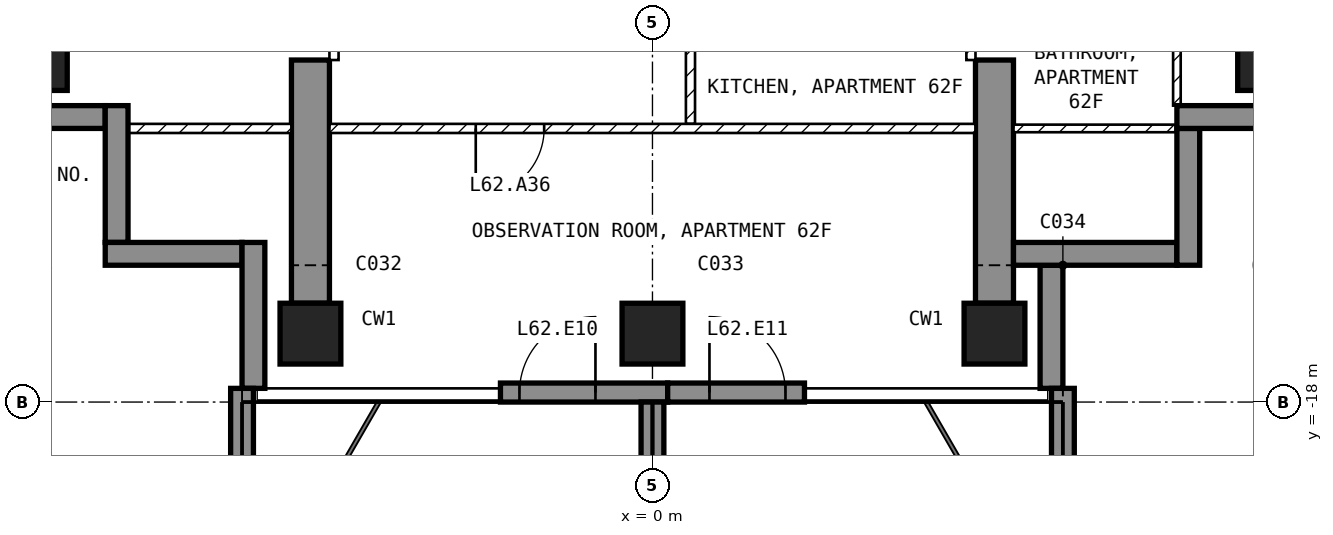
"""IFC4 building model, lengths in metres.
Left out: names, types, materials, properties, quantities, classifications, styles, units other than length and angle.
Written with IfcOpenShell. Run it as: python <this file> out.ifc"""

import sys

from ifc_helpers import new_model, si_unit, direction, frame, frame_2d, origin, origin_2d, place, context, subcontext, project, spatial, polyline, rectangle, outline, extrude, element, fill, save


model = new_model("IFC4")
c1 = context("Model", 3, precision=1e-05, world=origin(), true_north=direction((0.0, 1.0)))
c2 = subcontext(c1, "Body", "Model", "MODEL_VIEW")
j1 = project(units=[si_unit("LENGTHUNIT", "METRE"), si_unit("PLANEANGLEUNIT", "RADIAN")], contexts=[c1])
p1 = place(None, origin())
s1 = spatial("IfcSite", under=j1, at=p1, CompositionType="ELEMENT")
p2 = place(p1, origin())
s2 = spatial("IfcBuilding", under=s1, at=p2, CompositionType="ELEMENT")
p3 = place(p2, frame((0.0, 0.0, 246.5)))
s3 = spatial("IfcBuildingStorey", under=s2, at=p3, CompositionType="ELEMENT", Elevation=246.5)
for number, where, z_axis, x_axis in (
    (1, (-8.1, -13.5, -0.25), (0.0, 0.0, 1.0), (1.0, 0.0, 0.0)),
    (2, (-4.5, -17.1, -0.25), (0.0, 0.0, 1.0), (1.0, 0.0, 0.0)),
    (3, (0.0, -17.1, -0.25), (0.0, 0.0, 1.0), (1.0, 0.0, 0.0)),
    (4, (4.5, -17.1, -0.25), (0.0, 0.0, 1.0), (1.0, 0.0, 0.0)),
    (5, (8.1, -13.5, -0.25), (0.0, 0.0, 1.0), (1.0, 0.0, 0.0)),
):
    element("IfcColumn", number, at=place(p3, frame(where, z_axis=z_axis, x_axis=x_axis)), inside=s3, PredefinedType="COLUMN", context=c2, shape_type="SweptSolid", body=[
        extrude(rectangle(XDim=0.8, YDim=0.8, at=origin_2d()), origin(), (0.0, 0.0, 1.0), 3.5),
    ])
for number, where, z_axis, x_axis in (
    (6, (-4.75, -16.7, -0.25), (1.0, 0.0, 0.0), (0.0, 1.0, 0.0)),
    (7, (4.25, -16.7, -0.25), (1.0, 0.0, 0.0), (0.0, 1.0, 0.0)),
):
    element("IfcWall", number, at=place(p3, frame(where, z_axis=z_axis, x_axis=x_axis)), inside=s3, PredefinedType="SHEAR", context=c2, shape_type="SweptSolid", body=[
        extrude(outline(polyline([(0.0, 0.0), (3.2, 0.0), (3.2, 2.65), (5.6, 2.65), (5.6, 0.0), (7.7, 0.0), (7.7, 3.5), (0.0, 3.5), (0.0, 0.0)])), origin(), (0.0, 0.0, 1.0), 0.5),
    ])
p4 = place(p3, frame((-2.0, -17.875, 0.0), z_axis=(0.0, 0.0, 1.0), x_axis=(1.0, 0.0, 0.0)))
e8 = element("IfcWall", 8, at=p4, inside=s3, PredefinedType="SOLIDWALL", context=c2, shape_type="SweptSolid", body=[
    extrude(rectangle(XDim=2.2, YDim=0.25, at=frame_2d((1.1, 0.0))), origin(), (0.0, 0.0, 1.0), 3.25),
])
p5 = place(p4, frame((0.25, 0.0, 0.0)))
e9 = element("IfcOpeningElement", 9, at=p5, cuts=e8, PredefinedType="OPENING", context=c2, shape_type="SweptSolid", body=[
    extrude(rectangle(XDim=1.0, YDim=2.4, at=frame_2d((0.5, 1.2))), frame((0.0, 0.135, 0.0), z_axis=(0.0, -1.0, 0.0), x_axis=(1.0, 0.0, 0.0)), (0.0, 0.0, 1.0), 0.27),
])
p6 = place(p3, frame((0.2, -17.875, 0.0), z_axis=(0.0, 0.0, 1.0), x_axis=(1.0, 0.0, 0.0)))
e10 = element("IfcWall", 10, at=p6, inside=s3, PredefinedType="SOLIDWALL", context=c2, shape_type="SweptSolid", body=[
    extrude(rectangle(XDim=1.8, YDim=0.25, at=frame_2d((0.9, 0.0))), origin(), (0.0, 0.0, 1.0), 3.25),
])
p7 = place(p6, frame((0.55, 0.0, 0.0)))
e11 = element("IfcOpeningElement", 11, at=p7, cuts=e10, PredefinedType="OPENING", context=c2, shape_type="SweptSolid", body=[
    extrude(rectangle(XDim=1.0, YDim=2.4, at=frame_2d((0.5, 1.2))), frame((0.0, 0.135, 0.0), z_axis=(0.0, -1.0, 0.0), x_axis=(1.0, 0.0, 0.0)), (0.0, 0.0, 1.0), 0.27),
])
p8 = place(p3, frame((5.25, -17.82, 0.0), z_axis=(0.0, 0.0, 1.0), x_axis=(0.0, 1.0, 0.0)))
e12 = element("IfcWall", 12, at=p8, inside=s3, PredefinedType="SOLIDWALL", context=c2, shape_type="SweptSolid", body=[
    extrude(rectangle(XDim=1.62, YDim=0.3, at=frame_2d((0.81, 0.0))), origin(), (0.0, 0.0, 1.0), 3.25),
])
p9 = place(p3, frame((4.75, -16.05, 0.0), z_axis=(0.0, 0.0, 1.0), x_axis=(1.0, 0.0, 0.0)))
e13 = element("IfcWall", 13, at=p9, inside=s3, PredefinedType="SOLIDWALL", context=c2, shape_type="SweptSolid", body=[
    extrude(rectangle(XDim=2.15, YDim=0.3, at=frame_2d((1.075, 0.0))), origin(), (0.0, 0.0, 1.0), 3.25),
])
p10 = place(p3, frame((7.05, -16.2, 0.0), z_axis=(0.0, 0.0, 1.0), x_axis=(0.0, 1.0, 0.0)))
e14 = element("IfcWall", 14, at=p10, inside=s3, PredefinedType="SOLIDWALL", context=c2, shape_type="SweptSolid", body=[
    extrude(rectangle(XDim=1.8, YDim=0.3, at=frame_2d((0.9, 0.0))), origin(), (0.0, 0.0, 1.0), 3.25),
])
p11 = place(p3, frame((6.9, -14.25, 0.0), z_axis=(0.0, 0.0, 1.0), x_axis=(1.0, 0.0, 0.0)))
e15 = element("IfcWall", 15, at=p11, inside=s3, PredefinedType="SOLIDWALL", context=c2, shape_type="SweptSolid", body=[
    extrude(rectangle(XDim=1.85, YDim=0.3, at=frame_2d((0.925, 0.0))), origin(), (0.0, 0.0, 1.0), 3.25),
])
p12 = place(p3, frame((-8.75, -14.25, 0.0), z_axis=(0.0, 0.0, 1.0), x_axis=(1.0, 0.0, 0.0)))
e16 = element("IfcWall", 16, at=p12, inside=s3, PredefinedType="SOLIDWALL", context=c2, shape_type="SweptSolid", body=[
    extrude(rectangle(XDim=1.55, YDim=0.3, at=frame_2d((0.775, 0.0))), origin(), (0.0, 0.0, 1.0), 3.25),
])
p13 = place(p3, frame((-7.05, -14.1, 0.0), z_axis=(0.0, 0.0, 1.0), x_axis=(0.0, -1.0, 0.0)))
e17 = element("IfcWall", 17, at=p13, inside=s3, PredefinedType="SOLIDWALL", context=c2, shape_type="SweptSolid", body=[
    extrude(rectangle(XDim=1.8, YDim=0.3, at=frame_2d((0.9, 0.0))), origin(), (0.0, 0.0, 1.0), 3.25),
])
p14 = place(p3, frame((-7.2, -16.05, 0.0), z_axis=(0.0, 0.0, 1.0), x_axis=(1.0, 0.0, 0.0)))
e18 = element("IfcWall", 18, at=p14, inside=s3, PredefinedType="SOLIDWALL", context=c2, shape_type="SweptSolid", body=[
    extrude(rectangle(XDim=1.8, YDim=0.3, at=frame_2d((0.9, 0.0))), origin(), (0.0, 0.0, 1.0), 3.25),
])
p15 = place(p3, frame((-5.25, -15.9, 0.0), z_axis=(0.0, 0.0, 1.0), x_axis=(0.0, -1.0, 0.0)))
e19 = element("IfcWall", 19, at=p15, inside=s3, PredefinedType="SOLIDWALL", context=c2, shape_type="SweptSolid", body=[
    extrude(rectangle(XDim=1.92, YDim=0.3, at=frame_2d((0.96, 0.0))), origin(), (0.0, 0.0, 1.0), 3.25),
])
p16 = place(p3, frame((-5.4, -17.82, 0.0), z_axis=(0.0, 0.0, 1.0), x_axis=(0.0, -1.0, 0.0)))
e20 = element("IfcWall", 20, at=p16, inside=s3, PredefinedType="SOLIDWALL", context=c2, shape_type="SweptSolid", body=[
    extrude(rectangle(XDim=2.88, YDim=0.3, at=frame_2d((1.44, 0.0))), origin(), (0.0, 0.0, 1.0), 3.25),
])
p17 = place(p3, frame((0.0, -18.0, 0.0), z_axis=(0.0, 0.0, 1.0), x_axis=(0.0, -1.0, 0.0)))
e21 = element("IfcWall", 21, at=p17, inside=s3, PredefinedType="SOLIDWALL", context=c2, shape_type="SweptSolid", body=[
    extrude(rectangle(XDim=2.7, YDim=0.3, at=frame_2d((1.35, 0.0))), origin(), (0.0, 0.0, 1.0), 3.25),
])
p18 = place(p3, frame((5.4, -17.82, 0.0), z_axis=(0.0, 0.0, 1.0), x_axis=(0.0, -1.0, 0.0)))
e22 = element("IfcWall", 22, at=p18, inside=s3, PredefinedType="SOLIDWALL", context=c2, shape_type="SweptSolid", body=[
    extrude(rectangle(XDim=2.88, YDim=0.3, at=frame_2d((1.44, 0.0))), origin(), (0.0, 0.0, 1.0), 3.25),
])
p19 = place(p3, frame((0.5, -11.46, 0.0), z_axis=(0.0, 0.0, 1.0), x_axis=(0.0, -1.0, 0.0)))
e23 = element("IfcWall", 23, at=p19, inside=s3, PredefinedType="PARTITIONING", context=c2, shape_type="SweptSolid", body=[
    extrude(rectangle(XDim=2.88, YDim=0.12, at=frame_2d((1.44, 0.0))), origin(), (0.0, 0.0, 1.0), 3.25),
])
p20 = place(p19, frame((0.99, 0.0, 0.0)))
e24 = element("IfcOpeningElement", 24, at=p20, cuts=e23, PredefinedType="OPENING", context=c2, shape_type="SweptSolid", body=[
    extrude(rectangle(XDim=0.9, YDim=2.1, at=frame_2d((0.45, 1.05))), frame((0.0, 0.07, 0.0), z_axis=(0.0, -1.0, 0.0), x_axis=(1.0, 0.0, 0.0)), (0.0, 0.0, 1.0), 0.14),
])
p21 = place(p3, frame((4.25, -14.4, 0.0), z_axis=(0.0, 0.0, 1.0), x_axis=(-1.0, 0.0, 0.0)))
e25 = element("IfcWall", 25, at=p21, inside=s3, PredefinedType="PARTITIONING", context=c2, shape_type="SweptSolid", body=[
    extrude(rectangle(XDim=8.5, YDim=0.12, at=frame_2d((4.25, 0.0))), origin(), (0.0, 0.0, 1.0), 3.25),
])
p22 = place(p21, frame((5.675, 0.0, 0.0)))
e26 = element("IfcOpeningElement", 26, at=p22, cuts=e25, PredefinedType="OPENING", context=c2, shape_type="SweptSolid", body=[
    extrude(rectangle(XDim=0.9, YDim=2.1, at=frame_2d((0.45, 1.05))), frame((0.0, 0.07, 0.0), z_axis=(0.0, -1.0, 0.0), x_axis=(1.0, 0.0, 0.0)), (0.0, 0.0, 1.0), 0.14),
])
p23 = place(p3, frame((6.9, -14.1, 0.0), z_axis=(0.0, 0.0, 1.0), x_axis=(0.0, 1.0, 0.0)))
e27 = element("IfcWall", 27, at=p23, inside=s3, PredefinedType="PARTITIONING", context=c2, shape_type="SweptSolid", body=[
    extrude(rectangle(XDim=2.65, YDim=0.1, at=frame_2d((1.325, 0.0))), origin(), (0.0, 0.0, 1.0), 3.25),
])
p24 = place(p3, frame((7.12, -14.4, 0.0), z_axis=(0.0, 0.0, 1.0), x_axis=(-1.0, 0.0, 0.0)))
e28 = element("IfcWall", 28, at=p24, inside=s3, PredefinedType="PARTITIONING", context=c2, shape_type="SweptSolid", body=[
    extrude(rectangle(XDim=2.37, YDim=0.1, at=frame_2d((1.185, 0.0))), origin(), (0.0, 0.0, 1.0), 3.25),
])
p25 = place(p3, frame((-4.75, -14.4, 0.0), z_axis=(0.0, 0.0, 1.0), x_axis=(-1.0, 0.0, 0.0)))
e29 = element("IfcWall", 29, at=p25, inside=s3, PredefinedType="PARTITIONING", context=c2, shape_type="SweptSolid", body=[
    extrude(rectangle(XDim=2.37, YDim=0.12, at=frame_2d((1.185, 0.0))), origin(), (0.0, 0.0, 1.0), 3.25),
])
p26 = place(p3, frame((4.19, -11.1, 0.0), z_axis=(0.0, 0.0, 1.0), x_axis=(0.0, -1.0, 0.0)))
e30 = element("IfcWall", 30, at=p26, inside=s3, PredefinedType="PARTITIONING", context=c2, shape_type="SweptSolid", body=[
    extrude(rectangle(XDim=2.4, YDim=0.12, at=frame_2d((1.2, 0.0))), origin(), (0.0, 0.0, 1.0), 2.4),
])
p27 = place(p26, frame((0.75, 0.0, 0.0)))
e31 = element("IfcOpeningElement", 31, at=p27, cuts=e30, PredefinedType="OPENING", context=c2, shape_type="SweptSolid", body=[
    extrude(rectangle(XDim=0.9, YDim=2.1, at=frame_2d((0.45, 1.05))), frame((0.0, 0.07, 0.0), z_axis=(0.0, -1.0, 0.0), x_axis=(1.0, 0.0, 0.0)), (0.0, 0.0, 1.0), 0.14),
])
p28 = place(p3, frame((-4.19, -11.1, 0.0), z_axis=(0.0, 0.0, 1.0), x_axis=(0.0, -1.0, 0.0)))
e32 = element("IfcWall", 32, at=p28, inside=s3, PredefinedType="PARTITIONING", context=c2, shape_type="SweptSolid", body=[
    extrude(rectangle(XDim=2.4, YDim=0.12, at=frame_2d((1.2, 0.0))), origin(), (0.0, 0.0, 1.0), 2.4),
])
p29 = place(p28, frame((0.75, 0.0, 0.0)))
e33 = element("IfcOpeningElement", 33, at=p29, cuts=e32, PredefinedType="OPENING", context=c2, shape_type="SweptSolid", body=[
    extrude(rectangle(XDim=0.9, YDim=2.1, at=frame_2d((0.45, 1.05))), frame((0.0, 0.07, 0.0), z_axis=(0.0, -1.0, 0.0), x_axis=(1.0, 0.0, 0.0)), (0.0, 0.0, 1.0), 0.14),
])
p30 = place(p5, origin())
e34 = element("IfcDoor", 34, at=p30, inside=s3, OperationType="SINGLE_SWING_RIGHT", PredefinedType="DOOR", context=c2, shape_type="SweptSolid", body=[
    extrude(rectangle(XDim=1.0, YDim=2.4, at=frame_2d((0.5, 1.2))), frame((0.0, 0.025, 0.0), z_axis=(0.0, -1.0, 0.0), x_axis=(1.0, 0.0, 0.0)), (0.0, 0.0, 1.0), 0.05),
])
fill(e9, e34)
p31 = place(p7, origin())
e35 = element("IfcDoor", 35, at=p31, inside=s3, OperationType="SINGLE_SWING_LEFT", PredefinedType="DOOR", context=c2, shape_type="SweptSolid", body=[
    extrude(rectangle(XDim=1.0, YDim=2.4, at=frame_2d((0.5, 1.2))), frame((0.0, 0.025, 0.0), z_axis=(0.0, -1.0, 0.0), x_axis=(1.0, 0.0, 0.0)), (0.0, 0.0, 1.0), 0.05),
])
fill(e11, e35)
p32 = place(p22, origin())
e36 = element("IfcDoor", 36, at=p32, inside=s3, OperationType="SINGLE_SWING_RIGHT", PredefinedType="DOOR", context=c2, shape_type="SweptSolid", body=[
    extrude(rectangle(XDim=0.9, YDim=2.1, at=frame_2d((0.45, 1.05))), frame((0.0, 0.025, 0.0), z_axis=(0.0, -1.0, 0.0), x_axis=(1.0, 0.0, 0.0)), (0.0, 0.0, 1.0), 0.05),
])
fill(e26, e36)
save(model, sys.argv[1])
